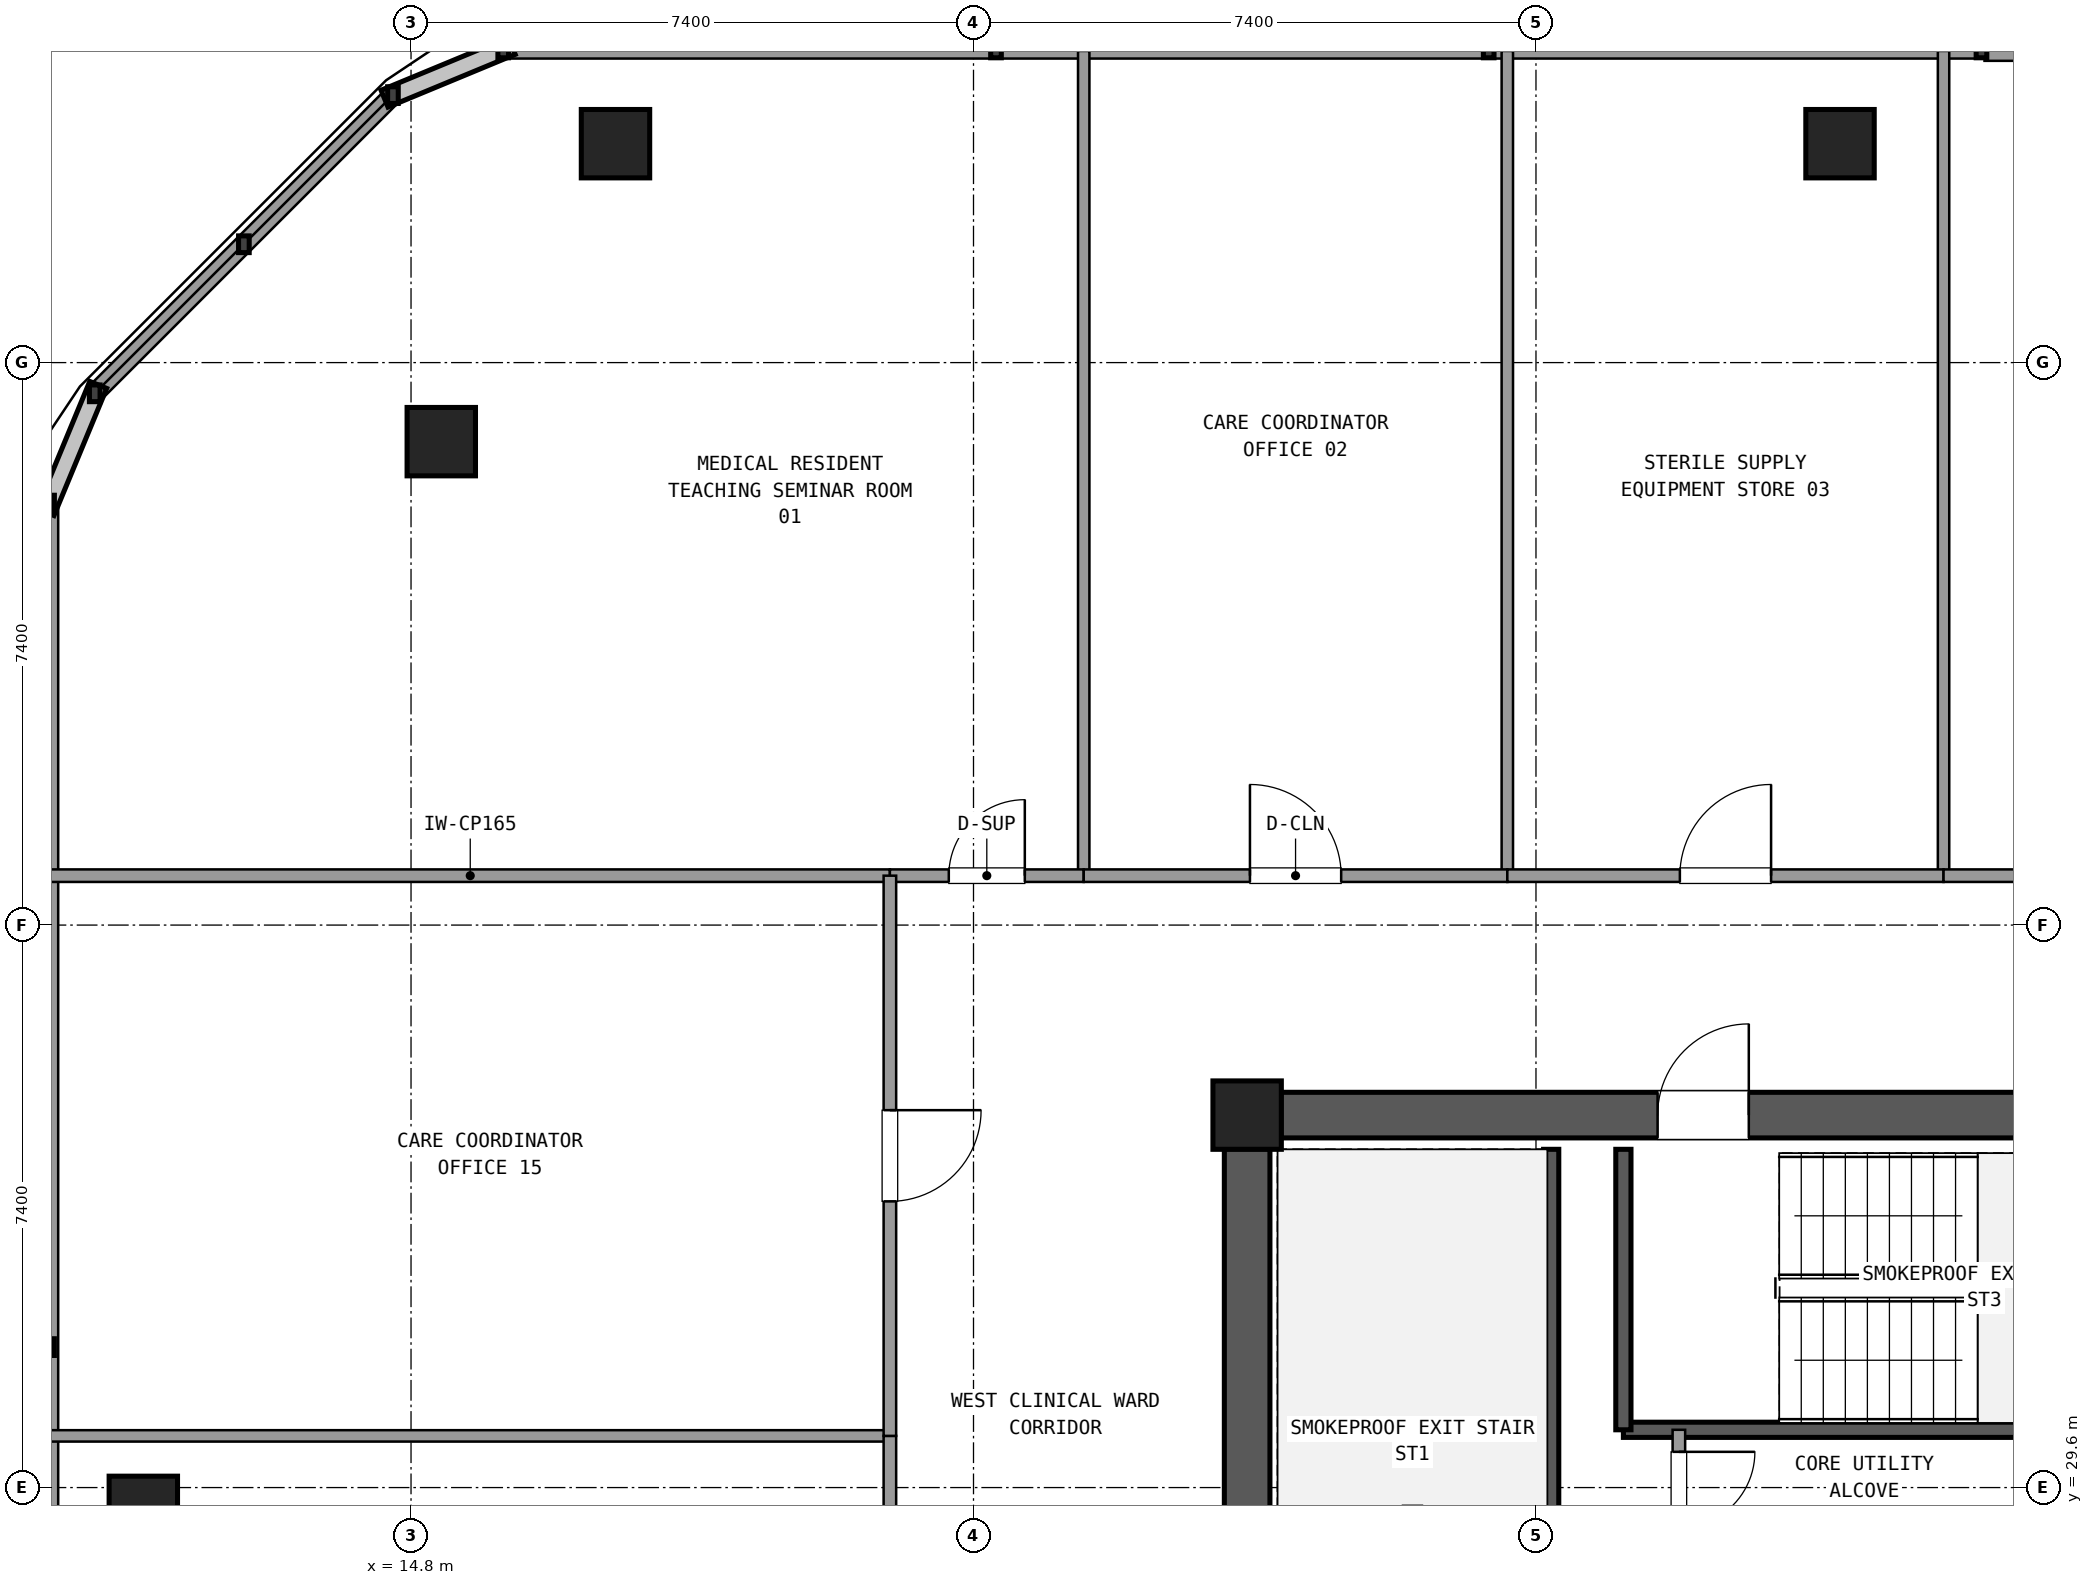
"""IFC4 building model, lengths in metres.
Left out: names, types, materials, properties, quantities, classifications, styles, units other than length and angle.
Written with IfcOpenShell. Run it as: python <this file> out.ifc"""

import sys

from ifc_helpers import new_model, si_unit, direction, frame, frame_2d, origin, origin_2d, place, context, subcontext, project, spatial, rectangle, extrude, element, fill, save


model = new_model("IFC4")
c1 = context("Model", 3, precision=1e-05, world=origin(), true_north=direction((0.0, 1.0)))
c2 = subcontext(c1, "Body", "Model", "MODEL_VIEW")
j1 = project(units=[si_unit("LENGTHUNIT", "METRE"), si_unit("PLANEANGLEUNIT", "RADIAN")], contexts=[c1])
p1 = place(None, origin())
s1 = spatial("IfcSite", under=j1, at=p1, CompositionType="ELEMENT")
p2 = place(p1, origin())
s2 = spatial("IfcBuilding", under=s1, at=p2, CompositionType="ELEMENT")
p3 = place(p2, frame((0.0, 0.0, 225.18)))
s3 = spatial("IfcBuildingStorey", under=s2, at=p3, CompositionType="ELEMENT", Elevation=225.18)
p4 = place(p3, frame((25.8, 34.5, 0.0), z_axis=(0.0, 0.0, 1.0), x_axis=(1.0, 0.0, 0.0)))
e1 = element("IfcColumn", 1, at=p4, inside=s3, PredefinedType="COLUMN", context=c2, shape_type="SweptSolid", body=[
    extrude(rectangle(XDim=0.9, YDim=0.9, at=origin_2d()), origin(), (0.0, 0.0, 1.0), 3.6),
])
p5 = place(p3, frame((36.555, 34.5, 0.0), z_axis=(0.0, 0.0, 1.0), x_axis=(-1.0, 0.0, 0.0)))
e2 = element("IfcWall", 2, at=p5, inside=s3, PredefinedType="SHEAR", context=c2, shape_type="SweptSolid", body=[
    extrude(rectangle(XDim=10.31, YDim=0.6, at=frame_2d((5.155, 0.0))), origin(), (0.0, 0.0, 1.0), 3.32),
])
p6 = place(p5, frame((4.155, 0.0, 0.0)))
e3 = element("IfcOpeningElement", 3, at=p6, cuts=e2, PredefinedType="OPENING", context=c2, shape_type="SweptSolid", body=[
    extrude(rectangle(XDim=1.2, YDim=2.15, at=frame_2d((0.6, 1.075))), frame((0.0, 0.31, 0.0), z_axis=(0.0, -1.0, 0.0), x_axis=(1.0, 0.0, 0.0)), (0.0, 0.0, 1.0), 0.62),
])
p7 = place(p3, frame((25.8, 34.055, 0.0), z_axis=(0.0, 0.0, 1.0), x_axis=(0.0, -1.0, 0.0)))
e4 = element("IfcWall", 4, at=p7, inside=s3, PredefinedType="SHEAR", context=c2, shape_type="SweptSolid", body=[
    extrude(rectangle(XDim=7.71, YDim=0.6, at=frame_2d((3.855, 0.0))), origin(), (0.0, 0.0, 1.0), 3.32),
])
for number, where, z_axis, x_axis in (
    (5, (33.6, 47.28, 0.0), (0.0, 0.0, 1.0), (1.0, 0.0, 0.0)),
    (6, (17.49, 47.28, 0.0), (0.0, 0.0, 1.0), (1.0, 0.0, 0.0)),
    (7, (15.198, 43.36, 0.0), (0.0, 0.0, 1.0), (1.0, 0.0, 0.0)),
    (8, (11.278, 29.3, 0.0), (0.0, 0.0, 1.0), (1.0, 0.0, 0.0)),
):
    element("IfcColumn", number, at=place(p3, frame(where, z_axis=z_axis, x_axis=x_axis)), inside=s3, PredefinedType="COLUMN", context=c2, shape_type="SweptSolid", body=[
        extrude(rectangle(XDim=0.9, YDim=0.9, at=origin_2d()), origin(), (0.0, 0.0, 1.0), 3.6),
    ])
p8 = place(p3, frame((38.501, 48.52, 0.0), z_axis=(0.0, 0.0, 1.0), x_axis=(-1.0, 0.0, 0.0)))
e9 = element("IfcWall", 9, at=p8, inside=s3, PredefinedType="SOLIDWALL", context=c2, shape_type="SweptSolid", body=[
    extrude(rectangle(XDim=3.0, YDim=0.3, at=frame_2d((1.5, 0.0))), origin(), (0.0, 0.0, 1.0), 2.69),
])
p9 = place(p8, frame((0.9, 0.0, 0.0)))
e10 = element("IfcOpeningElement", 10, at=p9, cuts=e9, PredefinedType="OPENING", context=c2, shape_type="SweptSolid", body=[
    extrude(rectangle(XDim=1.2, YDim=2.2, at=frame_2d((0.6, 1.1))), frame((0.0, 0.16, 0.0), z_axis=(0.0, -1.0, 0.0), x_axis=(1.0, 0.0, 0.0)), (0.0, 0.0, 1.0), 0.32),
])
p10 = place(p3, frame((35.461, 48.52, 0.0), z_axis=(0.0, 0.0, 1.0), x_axis=(-1.0, 0.0, 0.0)))
e11 = element("IfcWall", 11, at=p10, inside=s3, PredefinedType="SOLIDWALL", context=c2, shape_type="SweptSolid", body=[
    extrude(rectangle(XDim=19.448, YDim=0.24, at=frame_2d((9.724, 0.0))), origin(), (0.0, 0.0, 1.0), 0.85),
])
p11 = place(p3, frame((14.562, 47.919, 0.0), z_axis=(0.0, 0.0, 1.0), x_axis=(-0.707128783731, -0.707084777957, 0.0)))
e12 = element("IfcWall", 12, at=p11, inside=s3, PredefinedType="SOLIDWALL", context=c2, shape_type="SweptSolid", body=[
    extrude(rectangle(XDim=5.548, YDim=0.24, at=frame_2d((2.774, 0.0))), origin(), (0.0, 0.0, 1.0), 0.85),
])
p12 = place(p3, frame((10.038, 42.545, 0.0), z_axis=(0.0, 0.0, 1.0), x_axis=(0.0, -1.0, 0.0)))
e13 = element("IfcWall", 13, at=p12, inside=s3, PredefinedType="SOLIDWALL", context=c2, shape_type="SweptSolid", body=[
    extrude(rectangle(XDim=33.29, YDim=0.24, at=frame_2d((16.645, 0.0))), origin(), (0.0, 0.0, 1.0), 0.85),
])
p13 = place(p3, frame((29.8, 24.65, 0.0), z_axis=(0.0, 0.0, 1.0), x_axis=(0.0, 1.0, 0.0)))
e14 = element("IfcWall", 14, at=p13, inside=s3, PredefinedType="SHEAR", context=c2, shape_type="SweptSolid", body=[
    extrude(rectangle(XDim=9.4, YDim=0.2, at=frame_2d((4.7, 0.0))), origin(), (0.0, 0.0, 1.0), 3.32),
])
p14 = place(p3, frame((30.75, 30.36, 0.0), z_axis=(0.0, 0.0, 1.0), x_axis=(1.0, 0.0, 0.0)))
e15 = element("IfcWall", 15, at=p14, inside=s3, PredefinedType="SHEAR", context=c2, shape_type="SweptSolid", body=[
    extrude(rectangle(XDim=9.5, YDim=0.2, at=frame_2d((4.75, 0.0))), origin(), (0.0, 0.0, 1.0), 3.32),
])
p15 = place(p3, frame((30.75, 30.36, 0.0), z_axis=(0.0, 0.0, 1.0), x_axis=(0.0, 1.0, 0.0)))
e16 = element("IfcWall", 16, at=p15, inside=s3, PredefinedType="SHEAR", context=c2, shape_type="SweptSolid", body=[
    extrude(rectangle(XDim=3.69, YDim=0.2, at=frame_2d((1.845, 0.0))), origin(), (0.0, 0.0, 1.0), 3.32),
])
p16 = place(p3, frame((31.48, 26.32, 0.0), z_axis=(0.0, 0.0, 1.0), x_axis=(0.0, 1.0, 0.0)))
e17 = element("IfcWall", 17, at=p16, inside=s3, PredefinedType="PLUMBINGWALL", context=c2, shape_type="SweptSolid", body=[
    extrude(rectangle(XDim=4.04, YDim=0.165, at=frame_2d((2.02, 0.0))), origin(), (0.0, 0.0, 1.0), 2.61),
])
p17 = place(p16, frame((2.75, 0.0, 0.0)))
e18 = element("IfcOpeningElement", 18, at=p17, cuts=e17, PredefinedType="OPENING", context=c2, shape_type="SweptSolid", body=[
    extrude(rectangle(XDim=1.0, YDim=2.15, at=frame_2d((0.5, 1.075))), frame((0.0, 0.093, 0.0), z_axis=(0.0, -1.0, 0.0), x_axis=(1.0, 0.0, 0.0)), (0.0, 0.0, 1.0), 0.185),
])
p18 = place(p3, frame((10.058, 37.65, 0.0), z_axis=(0.0, 0.0, 1.0), x_axis=(1.0, 0.0, 0.0)))
e19 = element("IfcWall", 19, at=p18, inside=s3, PredefinedType="PARTITIONING", context=c2, shape_type="SweptSolid", body=[
    extrude(rectangle(XDim=11.042, YDim=0.165, at=frame_2d((5.521, 0.0))), origin(), (0.0, 0.0, 1.0), 2.61),
])
p19 = place(p3, frame((23.65, 37.65, 0.0), z_axis=(0.0, 0.0, 1.0), x_axis=(0.0, 1.0, 0.0)))
e20 = element("IfcWall", 20, at=p19, inside=s3, PredefinedType="PARTITIONING", context=c2, shape_type="SweptSolid", body=[
    extrude(rectangle(XDim=10.85, YDim=0.15, at=frame_2d((5.425, 0.0))), origin(), (0.0, 0.0, 1.0), 2.61),
])
p20 = place(p3, frame((21.1, 37.65, 0.0), z_axis=(0.0, 0.0, 1.0), x_axis=(1.0, 0.0, 0.0)))
e21 = element("IfcWall", 21, at=p20, inside=s3, PredefinedType="PARTITIONING", context=c2, shape_type="SweptSolid", body=[
    extrude(rectangle(XDim=2.55, YDim=0.165, at=frame_2d((1.275, 0.0))), origin(), (0.0, 0.0, 1.0), 2.61),
])
p21 = place(p20, frame((0.775, 0.0, 0.0)))
e22 = element("IfcOpeningElement", 22, at=p21, cuts=e21, PredefinedType="OPENING", context=c2, shape_type="SweptSolid", body=[
    extrude(rectangle(XDim=1.0, YDim=2.15, at=frame_2d((0.5, 1.075))), frame((0.0, 0.093, 0.0), z_axis=(0.0, -1.0, 0.0), x_axis=(1.0, 0.0, 0.0)), (0.0, 0.0, 1.0), 0.185),
])
p22 = place(p3, frame((29.223, 37.65, 0.0), z_axis=(0.0, 0.0, 1.0), x_axis=(0.0, 1.0, 0.0)))
e23 = element("IfcWall", 23, at=p22, inside=s3, PredefinedType="PARTITIONING", context=c2, shape_type="SweptSolid", body=[
    extrude(rectangle(XDim=10.85, YDim=0.15, at=frame_2d((5.425, 0.0))), origin(), (0.0, 0.0, 1.0), 2.61),
])
p23 = place(p3, frame((23.65, 37.65, 0.0), z_axis=(0.0, 0.0, 1.0), x_axis=(1.0, 0.0, 0.0)))
e24 = element("IfcWall", 24, at=p23, inside=s3, PredefinedType="PARTITIONING", context=c2, shape_type="SweptSolid", body=[
    extrude(rectangle(XDim=5.573, YDim=0.165, at=frame_2d((2.787, 0.0))), origin(), (0.0, 0.0, 1.0), 2.61),
])
p24 = place(p23, frame((2.187, 0.0, 0.0)))
e25 = element("IfcOpeningElement", 25, at=p24, cuts=e24, PredefinedType="OPENING", context=c2, shape_type="SweptSolid", body=[
    extrude(rectangle(XDim=1.2, YDim=2.15, at=frame_2d((0.6, 1.075))), frame((0.0, 0.093, 0.0), z_axis=(0.0, -1.0, 0.0), x_axis=(1.0, 0.0, 0.0)), (0.0, 0.0, 1.0), 0.185),
])
p25 = place(p3, frame((34.962, 37.65, 0.0), z_axis=(0.0, 0.0, 1.0), x_axis=(0.0, 1.0, 0.0)))
e26 = element("IfcWall", 26, at=p25, inside=s3, PredefinedType="PARTITIONING", context=c2, shape_type="SweptSolid", body=[
    extrude(rectangle(XDim=10.85, YDim=0.15, at=frame_2d((5.425, 0.0))), origin(), (0.0, 0.0, 1.0), 2.61),
])
p26 = place(p3, frame((29.223, 37.65, 0.0), z_axis=(0.0, 0.0, 1.0), x_axis=(1.0, 0.0, 0.0)))
e27 = element("IfcWall", 27, at=p26, inside=s3, PredefinedType="PARTITIONING", context=c2, shape_type="SweptSolid", body=[
    extrude(rectangle(XDim=5.739, YDim=0.165, at=frame_2d((2.87, 0.0))), origin(), (0.0, 0.0, 1.0), 2.61),
])
p27 = place(p26, frame((2.27, 0.0, 0.0)))
e28 = element("IfcOpeningElement", 28, at=p27, cuts=e27, PredefinedType="OPENING", context=c2, shape_type="SweptSolid", body=[
    extrude(rectangle(XDim=1.2, YDim=2.15, at=frame_2d((0.6, 1.075))), frame((0.0, 0.093, 0.0), z_axis=(0.0, -1.0, 0.0), x_axis=(1.0, 0.0, 0.0)), (0.0, 0.0, 1.0), 0.185),
])
p28 = place(p3, frame((34.962, 37.65, 0.0), z_axis=(0.0, 0.0, 1.0), x_axis=(1.0, 0.0, 0.0)))
e29 = element("IfcWall", 29, at=p28, inside=s3, PredefinedType="PARTITIONING", context=c2, shape_type="SweptSolid", body=[
    extrude(rectangle(XDim=8.259, YDim=0.165, at=frame_2d((4.129, 0.0))), origin(), (0.0, 0.0, 1.0), 2.61),
])
p29 = place(p28, frame((3.529, 0.0, 0.0)))
e30 = element("IfcOpeningElement", 30, at=p29, cuts=e29, PredefinedType="OPENING", context=c2, shape_type="SweptSolid", body=[
    extrude(rectangle(XDim=1.2, YDim=2.15, at=frame_2d((0.6, 1.075))), frame((0.0, 0.093, 0.0), z_axis=(0.0, -1.0, 0.0), x_axis=(1.0, 0.0, 0.0)), (0.0, 0.0, 1.0), 0.185),
])
p30 = place(p3, frame((21.1, 30.28, 0.0), z_axis=(0.0, 0.0, 1.0), x_axis=(-1.0, 0.0, 0.0)))
e31 = element("IfcWall", 31, at=p30, inside=s3, PredefinedType="PARTITIONING", context=c2, shape_type="SweptSolid", body=[
    extrude(rectangle(XDim=11.042, YDim=0.15, at=frame_2d((5.521, 0.0))), origin(), (0.0, 0.0, 1.0), 2.61),
])
p31 = place(p3, frame((21.1, 24.49, 0.0), z_axis=(0.0, 0.0, 1.0), x_axis=(0.0, 1.0, 0.0)))
e32 = element("IfcWall", 32, at=p31, inside=s3, PredefinedType="PARTITIONING", context=c2, shape_type="SweptSolid", body=[
    extrude(rectangle(XDim=5.79, YDim=0.165, at=frame_2d((2.895, 0.0))), origin(), (0.0, 0.0, 1.0), 2.61),
])
p32 = place(p31, frame((2.295, 0.0, 0.0)))
e33 = element("IfcOpeningElement", 33, at=p32, cuts=e32, PredefinedType="OPENING", context=c2, shape_type="SweptSolid", body=[
    extrude(rectangle(XDim=1.2, YDim=2.15, at=frame_2d((0.6, 1.075))), frame((0.0, 0.093, 0.0), z_axis=(0.0, -1.0, 0.0), x_axis=(1.0, 0.0, 0.0)), (0.0, 0.0, 1.0), 0.185),
])
p33 = place(p3, frame((21.1, 30.28, 0.0), z_axis=(0.0, 0.0, 1.0), x_axis=(0.0, 1.0, 0.0)))
e34 = element("IfcWall", 34, at=p33, inside=s3, PredefinedType="PARTITIONING", context=c2, shape_type="SweptSolid", body=[
    extrude(rectangle(XDim=7.37, YDim=0.165, at=frame_2d((3.685, 0.0))), origin(), (0.0, 0.0, 1.0), 2.61),
])
p34 = place(p33, frame((3.085, 0.0, 0.0)))
e35 = element("IfcOpeningElement", 35, at=p34, cuts=e34, PredefinedType="OPENING", context=c2, shape_type="SweptSolid", body=[
    extrude(rectangle(XDim=1.2, YDim=2.15, at=frame_2d((0.6, 1.075))), frame((0.0, 0.093, 0.0), z_axis=(0.0, -1.0, 0.0), x_axis=(1.0, 0.0, 0.0)), (0.0, 0.0, 1.0), 0.185),
])
p35 = place(p6, frame((1.2, 0.0, 0.0), z_axis=(0.0, 0.0, 1.0), x_axis=(-1.0, 0.0, 0.0)))
e36 = element("IfcDoor", 36, at=p35, inside=s3, OperationType="SINGLE_SWING_LEFT", PredefinedType="DOOR", context=c2, shape_type="SweptSolid", body=[
    extrude(rectangle(XDim=1.2, YDim=2.15, at=frame_2d((0.6, 1.075))), frame((0.0, 0.025, 0.0), z_axis=(0.0, -1.0, 0.0), x_axis=(1.0, 0.0, 0.0)), (0.0, 0.0, 1.0), 0.05),
])
fill(e3, e36)
p36 = place(p17, frame((1.0, 0.0, 0.0), z_axis=(0.0, 0.0, 1.0), x_axis=(-1.0, 0.0, 0.0)))
e37 = element("IfcDoor", 37, at=p36, inside=s3, OperationType="SINGLE_SWING_RIGHT", PredefinedType="DOOR", context=c2, shape_type="SweptSolid", body=[
    extrude(rectangle(XDim=1.0, YDim=2.15, at=frame_2d((0.5, 1.075))), frame((0.0, 0.025, 0.0), z_axis=(0.0, -1.0, 0.0), x_axis=(1.0, 0.0, 0.0)), (0.0, 0.0, 1.0), 0.05),
])
fill(e18, e37)
p37 = place(p21, origin())
e38 = element("IfcDoor", 38, at=p37, inside=s3, OperationType="SINGLE_SWING_RIGHT", PredefinedType="DOOR", context=c2, shape_type="SweptSolid", body=[
    extrude(rectangle(XDim=1.0, YDim=2.15, at=frame_2d((0.5, 1.075))), frame((0.0, 0.025, 0.0), z_axis=(0.0, -1.0, 0.0), x_axis=(1.0, 0.0, 0.0)), (0.0, 0.0, 1.0), 0.05),
])
fill(e22, e38)
p38 = place(p24, origin())
e39 = element("IfcDoor", 39, at=p38, inside=s3, OperationType="SINGLE_SWING_LEFT", PredefinedType="DOOR", context=c2, shape_type="SweptSolid", body=[
    extrude(rectangle(XDim=1.2, YDim=2.15, at=frame_2d((0.6, 1.075))), frame((0.0, 0.025, 0.0), z_axis=(0.0, -1.0, 0.0), x_axis=(1.0, 0.0, 0.0)), (0.0, 0.0, 1.0), 0.05),
])
fill(e25, e39)
p39 = place(p27, origin())
e40 = element("IfcDoor", 40, at=p39, inside=s3, OperationType="SINGLE_SWING_RIGHT", PredefinedType="DOOR", context=c2, shape_type="SweptSolid", body=[
    extrude(rectangle(XDim=1.2, YDim=2.15, at=frame_2d((0.6, 1.075))), frame((0.0, 0.025, 0.0), z_axis=(0.0, -1.0, 0.0), x_axis=(1.0, 0.0, 0.0)), (0.0, 0.0, 1.0), 0.05),
])
fill(e28, e40)
p40 = place(p34, frame((1.2, 0.0, 0.0), z_axis=(0.0, 0.0, 1.0), x_axis=(-1.0, 0.0, 0.0)))
e41 = element("IfcDoor", 41, at=p40, inside=s3, OperationType="SINGLE_SWING_RIGHT", PredefinedType="DOOR", context=c2, shape_type="SweptSolid", body=[
    extrude(rectangle(XDim=1.2, YDim=2.15, at=frame_2d((0.6, 1.075))), frame((0.0, 0.025, 0.0), z_axis=(0.0, -1.0, 0.0), x_axis=(1.0, 0.0, 0.0)), (0.0, 0.0, 1.0), 0.05),
])
fill(e35, e41)
save(model, sys.argv[1])
